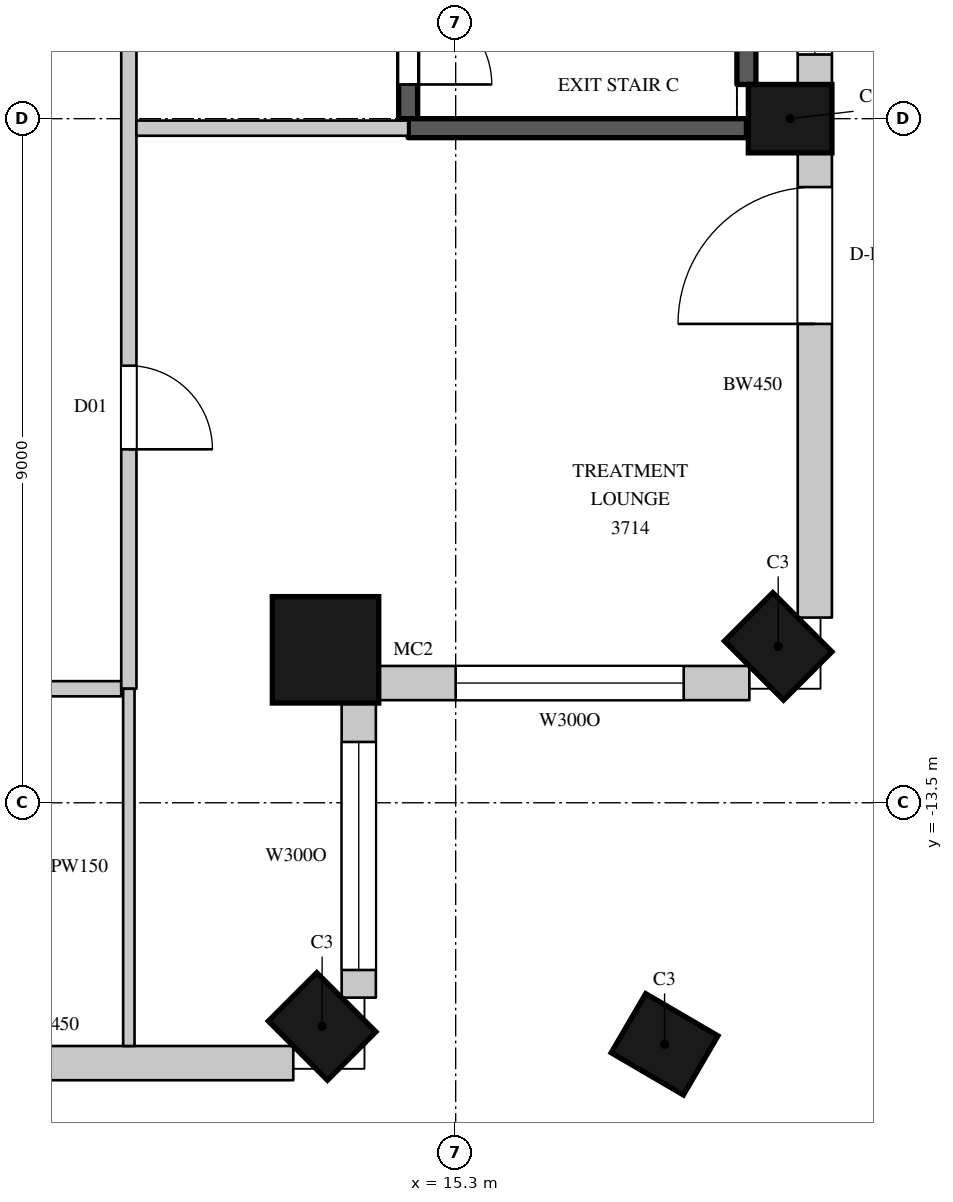
"""IFC4 building model, lengths in metres.
Left out: names, types, materials, properties, quantities, classifications, styles, units other than length and angle.
Written with IfcOpenShell. Run it as: python <this file> out.ifc"""

import sys

from ifc_helpers import new_model, si_unit, direction, frame, frame_2d, origin, origin_2d, place, context, subcontext, project, spatial, rectangle, circle, extrude, element, fill, save


model = new_model("IFC4")
c1 = context("Model", 3, precision=1e-05, world=origin(), true_north=direction((0.0, 1.0)))
c2 = subcontext(c1, "Body", "Model", "MODEL_VIEW")
j1 = project(units=[si_unit("LENGTHUNIT", "METRE"), si_unit("PLANEANGLEUNIT", "RADIAN")], contexts=[c1])
p1 = place(None, origin())
s1 = spatial("IfcSite", under=j1, at=p1, CompositionType="ELEMENT")
p2 = place(p1, origin())
s2 = spatial("IfcBuilding", under=s1, at=p2, CompositionType="ELEMENT")
p3 = place(p2, frame((0.0, 0.0, 172.8)))
s3 = spatial("IfcBuildingStorey", under=s2, at=p3, CompositionType="ELEMENT", Elevation=172.8)
p4 = place(p3, frame((13.543, -16.443, 0.0), z_axis=(0.0, 0.0, 1.0), x_axis=(0.707106781187, 0.707106781187, 0.0)))
e1 = element("IfcColumn", 1, at=p4, inside=s3, PredefinedType="COLUMN", context=c2, shape_type="SweptSolid", body=[
    extrude(rectangle(XDim=0.9, YDim=1.1, at=origin_2d()), origin(), (0.0, 0.0, 1.0), 4.1),
])
p5 = place(p3, frame((13.588, -11.488, 0.0), z_axis=(0.0, 0.0, 1.0), x_axis=(1.0, 0.0, 0.0)))
e2 = element("IfcColumn", 2, at=p5, inside=s3, PredefinedType="COLUMN", context=c2, shape_type="SweptSolid", body=[
    extrude(circle(Radius=0.7, at=origin_2d()), origin(), (0.0, 0.0, 1.0), 4.1),
])
for number, where, z_axis, x_axis in (
    (3, (19.543, -11.443, 0.0), (0.0, 0.0, 1.0), (0.707, 0.707, 0.0)),
    (4, (19.7, -4.5, 0.0), (0.0, 0.0, 1.0), (0.0, 1.0, 0.0)),
    (5, (18.048, -16.677, 0.0), (0.0, 0.0, 1.0), (0.504, 0.863, 0.0)),
):
    element("IfcColumn", number, at=place(p3, frame(where, z_axis=z_axis, x_axis=x_axis)), inside=s3, PredefinedType="COLUMN", context=c2, shape_type="SweptSolid", body=[
        extrude(rectangle(XDim=0.9, YDim=1.1, at=origin_2d()), origin(), (0.0, 0.0, 1.0), 4.1),
    ])
p6 = place(p3, frame((6.75, -16.925, 0.0), z_axis=(0.0, 0.0, 1.0), x_axis=(1.0, 0.0, 0.0)))
e6 = element("IfcWall", 6, at=p6, inside=s3, PredefinedType="SOLIDWALL", context=c2, shape_type="SweptSolid", body=[
    extrude(rectangle(XDim=6.414, YDim=0.45, at=frame_2d((3.207, 0.0))), origin(), (0.0, 0.0, 1.0), 3.8),
])
p7 = place(p6, frame((0.525, 0.0, 0.0)))
e7 = element("IfcOpeningElement", 7, at=p7, cuts=e6, PredefinedType="OPENING", context=c2, shape_type="SweptSolid", body=[
    extrude(rectangle(XDim=1.8, YDim=2.4, at=frame_2d((0.9, 1.2))), frame((0.0, 0.235, 0.0), z_axis=(0.0, -1.0, 0.0), x_axis=(1.0, 0.0, 0.0)), (0.0, 0.0, 1.0), 0.47),
])
p8 = place(p3, frame((14.025, -16.064, 0.0), z_axis=(0.0, 0.0, 1.0), x_axis=(0.0, 1.0, 0.0)))
e8 = element("IfcWall", 8, at=p8, inside=s3, PredefinedType="SOLIDWALL", context=c2, shape_type="SweptSolid", body=[
    extrude(rectangle(XDim=3.909, YDim=0.45, at=frame_2d((1.955, 0.0))), origin(), (0.0, 0.0, 1.0), 3.8),
])
p9 = place(p8, frame((0.364, 0.0, 1.05)))
e9 = element("IfcOpeningElement", 9, at=p9, cuts=e8, PredefinedType="OPENING", context=c2, shape_type="SweptSolid", body=[
    extrude(rectangle(XDim=3.0, YDim=2.4, at=frame_2d((1.5, 1.2))), frame((0.0, 0.235, 0.0), z_axis=(0.0, -1.0, 0.0), x_axis=(1.0, 0.0, 0.0)), (0.0, 0.0, 1.0), 0.47),
])
p10 = place(p3, frame((14.255, -11.925, 0.0), z_axis=(0.0, 0.0, 1.0), x_axis=(1.0, 0.0, 0.0)))
e10 = element("IfcWall", 10, at=p10, inside=s3, PredefinedType="SOLIDWALL", context=c2, shape_type="SweptSolid", body=[
    extrude(rectangle(XDim=4.909, YDim=0.45, at=frame_2d((2.455, 0.0))), origin(), (0.0, 0.0, 1.0), 3.8),
])
p11 = place(p10, frame((1.045, 0.0, 1.05)))
e11 = element("IfcOpeningElement", 11, at=p11, cuts=e10, PredefinedType="OPENING", context=c2, shape_type="SweptSolid", body=[
    extrude(rectangle(XDim=3.0, YDim=2.4, at=frame_2d((1.5, 1.2))), frame((0.0, 0.235, 0.0), z_axis=(0.0, -1.0, 0.0), x_axis=(1.0, 0.0, 0.0)), (0.0, 0.0, 1.0), 0.47),
])
p12 = place(p3, frame((20.025, -11.064, 0.0), z_axis=(0.0, 0.0, 1.0), x_axis=(0.0, 1.0, 0.0)))
e12 = element("IfcWall", 12, at=p12, inside=s3, PredefinedType="SOLIDWALL", context=c2, shape_type="SweptSolid", body=[
    extrude(rectangle(XDim=6.114, YDim=0.45, at=frame_2d((3.057, 0.0))), origin(), (0.0, 0.0, 1.0), 3.8),
])
p13 = place(p12, frame((3.864, 0.0, 0.0)))
e13 = element("IfcOpeningElement", 13, at=p13, cuts=e12, PredefinedType="OPENING", context=c2, shape_type="SweptSolid", body=[
    extrude(rectangle(XDim=1.8, YDim=2.4, at=frame_2d((0.9, 1.2))), frame((0.0, 0.235, 0.0), z_axis=(0.0, -1.0, 0.0), x_axis=(1.0, 0.0, 0.0)), (0.0, 0.0, 1.0), 0.47),
])
p14 = place(p3, frame((20.025, -4.05, 0.0), z_axis=(0.0, 0.0, 1.0), x_axis=(0.0, 1.0, 0.0)))
e14 = element("IfcWall", 14, at=p14, inside=s3, PredefinedType="SOLIDWALL", context=c2, shape_type="SweptSolid", body=[
    extrude(rectangle(XDim=8.439, YDim=0.45, at=frame_2d((4.219, 0.0))), origin(), (0.0, 0.0, 1.0), 3.8),
])
p15 = place(p14, frame((0.394, 0.0, 1.05)))
e15 = element("IfcOpeningElement", 15, at=p15, cuts=e14, PredefinedType="OPENING", context=c2, shape_type="SweptSolid", body=[
    extrude(rectangle(XDim=3.0, YDim=2.4, at=frame_2d((1.5, 1.2))), frame((0.0, 0.235, 0.0), z_axis=(0.0, -1.0, 0.0), x_axis=(1.0, 0.0, 0.0)), (0.0, 0.0, 1.0), 0.47),
])
p16 = place(p14, frame((5.082, 0.0, 1.05)))
e16 = element("IfcOpeningElement", 16, at=p16, cuts=e14, PredefinedType="OPENING", context=c2, shape_type="SweptSolid", body=[
    extrude(rectangle(XDim=3.0, YDim=2.4, at=frame_2d((1.5, 1.2))), frame((0.0, 0.235, 0.0), z_axis=(0.0, -1.0, 0.0), x_axis=(1.0, 0.0, 0.0)), (0.0, 0.0, 1.0), 0.47),
])
p17 = place(p3, frame((-10.9, -12.0, 0.0), z_axis=(0.0, 0.0, 1.0), x_axis=(1.0, 0.0, 0.0)))
e17 = element("IfcWall", 17, at=p17, inside=s3, PredefinedType="PARTITIONING", context=c2, shape_type="SweptSolid", body=[
    extrude(rectangle(XDim=21.8, YDim=0.2, at=frame_2d((10.9, 0.0))), origin(), (0.0, 0.0, 1.0), 3.8),
])
p18 = place(p17, frame((0.95, 0.0, 0.0)))
e18 = element("IfcOpeningElement", 18, at=p18, cuts=e17, PredefinedType="OPENING", context=c2, shape_type="SweptSolid", body=[
    extrude(rectangle(XDim=0.9, YDim=2.2, at=frame_2d((0.45, 1.1))), frame((0.0, 0.11, 0.0), z_axis=(0.0, -1.0, 0.0), x_axis=(1.0, 0.0, 0.0)), (0.0, 0.0, 1.0), 0.22),
])
p19 = place(p17, frame((3.95, 0.0, 0.0)))
e19 = element("IfcOpeningElement", 19, at=p19, cuts=e17, PredefinedType="OPENING", context=c2, shape_type="SweptSolid", body=[
    extrude(rectangle(XDim=0.9, YDim=2.2, at=frame_2d((0.45, 1.1))), frame((0.0, 0.11, 0.0), z_axis=(0.0, -1.0, 0.0), x_axis=(1.0, 0.0, 0.0)), (0.0, 0.0, 1.0), 0.22),
])
p20 = place(p17, frame((6.7, 0.0, 0.0)))
e20 = element("IfcOpeningElement", 20, at=p20, cuts=e17, PredefinedType="OPENING", context=c2, shape_type="SweptSolid", body=[
    extrude(rectangle(XDim=0.9, YDim=2.2, at=frame_2d((0.45, 1.1))), frame((0.0, 0.11, 0.0), z_axis=(0.0, -1.0, 0.0), x_axis=(1.0, 0.0, 0.0)), (0.0, 0.0, 1.0), 0.22),
])
p21 = place(p17, frame((10.0, 0.0, 0.0)))
e21 = element("IfcOpeningElement", 21, at=p21, cuts=e17, PredefinedType="OPENING", context=c2, shape_type="SweptSolid", body=[
    extrude(rectangle(XDim=0.9, YDim=2.2, at=frame_2d((0.45, 1.1))), frame((0.0, 0.11, 0.0), z_axis=(0.0, -1.0, 0.0), x_axis=(1.0, 0.0, 0.0)), (0.0, 0.0, 1.0), 0.22),
])
p22 = place(p17, frame((13.55, 0.0, 0.0)))
e22 = element("IfcOpeningElement", 22, at=p22, cuts=e17, PredefinedType="OPENING", context=c2, shape_type="SweptSolid", body=[
    extrude(rectangle(XDim=0.9, YDim=2.2, at=frame_2d((0.45, 1.1))), frame((0.0, 0.11, 0.0), z_axis=(0.0, -1.0, 0.0), x_axis=(1.0, 0.0, 0.0)), (0.0, 0.0, 1.0), 0.22),
])
p23 = place(p17, frame((15.8, 0.0, 0.0)))
e23 = element("IfcOpeningElement", 23, at=p23, cuts=e17, PredefinedType="OPENING", context=c2, shape_type="SweptSolid", body=[
    extrude(rectangle(XDim=1.1, YDim=2.4, at=frame_2d((0.55, 1.2))), frame((0.0, 0.11, 0.0), z_axis=(0.0, -1.0, 0.0), x_axis=(1.0, 0.0, 0.0)), (0.0, 0.0, 1.0), 0.22),
])
p24 = place(p17, frame((18.0, 0.0, 0.0)))
e24 = element("IfcOpeningElement", 24, at=p24, cuts=e17, PredefinedType="OPENING", context=c2, shape_type="SweptSolid", body=[
    extrude(rectangle(XDim=1.1, YDim=2.4, at=frame_2d((0.55, 1.2))), frame((0.0, 0.11, 0.0), z_axis=(0.0, -1.0, 0.0), x_axis=(1.0, 0.0, 0.0)), (0.0, 0.0, 1.0), 0.22),
])
p25 = place(p3, frame((11.0, -12.0, 0.0), z_axis=(0.0, 0.0, 1.0), x_axis=(0.0, 1.0, 0.0)))
e25 = element("IfcWall", 25, at=p25, inside=s3, PredefinedType="PARTITIONING", context=c2, shape_type="SweptSolid", body=[
    extrude(rectangle(XDim=24.1, YDim=0.2, at=frame_2d((12.05, 0.0))), origin(), (0.0, 0.0, 1.0), 3.8),
])
p26 = place(p25, frame((9.85, 0.0, 0.0)))
e26 = element("IfcOpeningElement", 26, at=p26, cuts=e25, PredefinedType="OPENING", context=c2, shape_type="SweptSolid", body=[
    extrude(rectangle(XDim=1.5, YDim=2.4, at=frame_2d((0.75, 1.2))), frame((0.0, 0.11, 0.0), z_axis=(0.0, -1.0, 0.0), x_axis=(1.0, 0.0, 0.0)), (0.0, 0.0, 1.0), 0.22),
])
p27 = place(p25, frame((3.15, 0.0, 0.0)))
e27 = element("IfcOpeningElement", 27, at=p27, cuts=e25, PredefinedType="OPENING", context=c2, shape_type="SweptSolid", body=[
    extrude(rectangle(XDim=1.1, YDim=2.4, at=frame_2d((0.55, 1.2))), frame((0.0, 0.11, 0.0), z_axis=(0.0, -1.0, 0.0), x_axis=(1.0, 0.0, 0.0)), (0.0, 0.0, 1.0), 0.22),
])
p28 = place(p3, frame((11.1, -4.625, 0.0), z_axis=(0.0, 0.0, 1.0), x_axis=(1.0, 0.0, 0.0)))
e28 = element("IfcWall", 28, at=p28, inside=s3, PredefinedType="PARTITIONING", context=c2, shape_type="SweptSolid", body=[
    extrude(rectangle(XDim=3.575, YDim=0.2, at=frame_2d((1.788, 0.0))), origin(), (0.0, 0.0, 1.0), 3.8),
])
p29 = place(p3, frame((11.0, -16.7, 0.0), z_axis=(0.0, 0.0, 1.0), x_axis=(0.0, 1.0, 0.0)))
e29 = element("IfcWall", 29, at=p29, inside=s3, PredefinedType="PARTITIONING", context=c2, shape_type="SweptSolid", body=[
    extrude(rectangle(XDim=4.7, YDim=0.15, at=frame_2d((2.35, 0.0))), origin(), (0.0, 0.0, 1.0), 3.8),
])
p30 = place(p3, frame((14.675, -4.5, 0.0), z_axis=(0.0, 0.0, 1.0), x_axis=(0.0, 1.0, 0.0)))
e30 = element("IfcWall", 30, at=p30, inside=s3, PredefinedType="SHEAR", context=c2, shape_type="SweptSolid", body=[
    extrude(rectangle(XDim=9.0, YDim=0.25, at=frame_2d((4.5, 0.0))), origin(), (0.0, 0.0, 1.0), 3.8),
])
p31 = place(p30, frame((0.45, 0.0, 0.0)))
e31 = element("IfcOpeningElement", 31, at=p31, cuts=e30, PredefinedType="OPENING", context=c2, shape_type="SweptSolid", body=[
    extrude(rectangle(XDim=1.1, YDim=2.2, at=frame_2d((0.55, 1.1))), frame((0.0, 0.135, 0.0), z_axis=(0.0, -1.0, 0.0), x_axis=(1.0, 0.0, 0.0)), (0.0, 0.0, 1.0), 0.27),
])
p32 = place(p3, frame((14.675, -4.625, 0.0), z_axis=(0.0, 0.0, 1.0), x_axis=(1.0, 0.0, 0.0)))
e32 = element("IfcWall", 32, at=p32, inside=s3, PredefinedType="SHEAR", context=c2, shape_type="SweptSolid", body=[
    extrude(rectangle(XDim=4.45, YDim=0.25, at=frame_2d((2.225, 0.0))), origin(), (0.0, 0.0, 1.0), 3.8),
])
p33 = place(p3, frame((19.125, -4.05, 0.0), z_axis=(0.0, 0.0, 1.0), x_axis=(0.0, 1.0, 0.0)))
e33 = element("IfcWall", 33, at=p33, inside=s3, PredefinedType="SHEAR", context=c2, shape_type="SweptSolid", body=[
    extrude(rectangle(XDim=8.477, YDim=0.25, at=frame_2d((4.238, 0.0))), origin(), (0.0, 0.0, 1.0), 3.8),
])
p34 = place(p9, origin())
e34 = element("IfcWindow", 34, at=p34, inside=s3, PartitioningType="SINGLE_PANEL", PredefinedType="WINDOW", context=c2, shape_type="SweptSolid", body=[
    extrude(rectangle(XDim=3.0, YDim=2.4, at=frame_2d((1.5, 1.2))), frame((0.0, 0.135, 0.0), z_axis=(0.0, -1.0, 0.0), x_axis=(1.0, 0.0, 0.0)), (0.0, 0.0, 1.0), 0.06),
])
fill(e9, e34)
p35 = place(p11, origin())
e35 = element("IfcWindow", 35, at=p35, inside=s3, PartitioningType="SINGLE_PANEL", PredefinedType="WINDOW", context=c2, shape_type="SweptSolid", body=[
    extrude(rectangle(XDim=3.0, YDim=2.4, at=frame_2d((1.5, 1.2))), frame((0.0, 0.135, 0.0), z_axis=(0.0, -1.0, 0.0), x_axis=(1.0, 0.0, 0.0)), (0.0, 0.0, 1.0), 0.06),
])
fill(e11, e35)
p36 = place(p13, origin())
e36 = element("IfcDoor", 36, at=p36, inside=s3, OperationType="SLIDING_TO_LEFT", PredefinedType="DOOR", context=c2, shape_type="SweptSolid", body=[
    extrude(rectangle(XDim=1.8, YDim=2.4, at=frame_2d((0.9, 1.2))), frame((0.0, 0.13, 0.0), z_axis=(0.0, -1.0, 0.0), x_axis=(1.0, 0.0, 0.0)), (0.0, 0.0, 1.0), 0.05),
])
fill(e13, e36)
p37 = place(p15, origin())
e37 = element("IfcWindow", 37, at=p37, inside=s3, PartitioningType="SINGLE_PANEL", PredefinedType="WINDOW", context=c2, shape_type="SweptSolid", body=[
    extrude(rectangle(XDim=3.0, YDim=2.4, at=frame_2d((1.5, 1.2))), frame((0.0, 0.135, 0.0), z_axis=(0.0, -1.0, 0.0), x_axis=(1.0, 0.0, 0.0)), (0.0, 0.0, 1.0), 0.06),
])
fill(e15, e37)
p38 = place(p27, origin())
e38 = element("IfcDoor", 38, at=p38, inside=s3, OperationType="SINGLE_SWING_RIGHT", PredefinedType="DOOR", context=c2, shape_type="SweptSolid", body=[
    extrude(rectangle(XDim=1.1, YDim=2.4, at=frame_2d((0.55, 1.2))), frame((0.0, 0.025, 0.0), z_axis=(0.0, -1.0, 0.0), x_axis=(1.0, 0.0, 0.0)), (0.0, 0.0, 1.0), 0.05),
])
fill(e27, e38)
p39 = place(p31, origin())
e39 = element("IfcDoor", 39, at=p39, inside=s3, OperationType="SINGLE_SWING_RIGHT", PredefinedType="DOOR", context=c2, shape_type="SweptSolid", body=[
    extrude(rectangle(XDim=1.1, YDim=2.2, at=frame_2d((0.55, 1.1))), frame((0.0, 0.025, 0.0), z_axis=(0.0, -1.0, 0.0), x_axis=(1.0, 0.0, 0.0)), (0.0, 0.0, 1.0), 0.05),
])
fill(e31, e39)
save(model, sys.argv[1])
